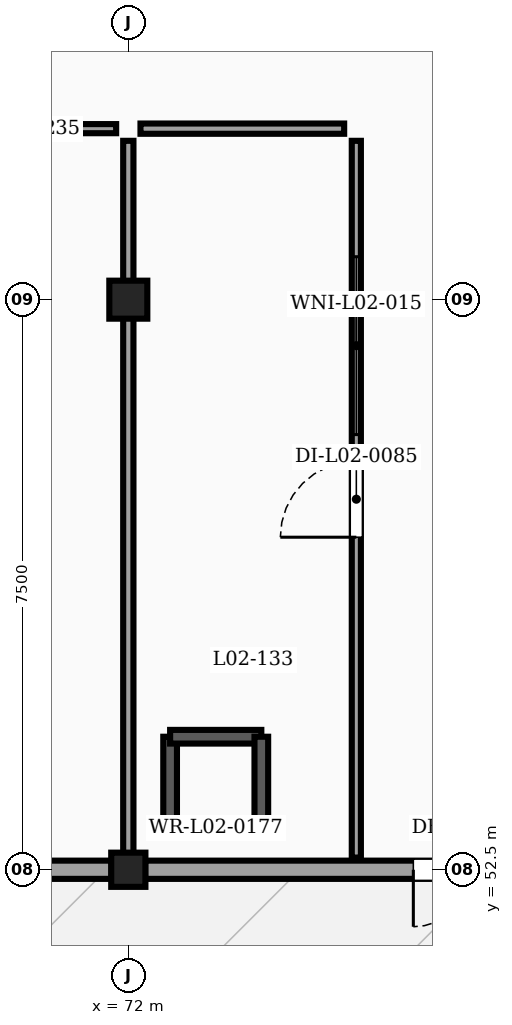
"""IFC4 building model, lengths in metres.
Left out: names, types, materials, properties, quantities, classifications, styles, units other than length and angle.
Written with IfcOpenShell. Run it as: python <this file> out.ifc"""

import sys

from ifc_helpers import new_model, si_unit, direction, frame, frame_2d, origin, origin_2d, place, context, subcontext, project, spatial, rectangle, extrude, element, fill, save


model = new_model("IFC4")
c1 = context("Model", 3, precision=1e-05, world=origin(), true_north=direction((0.0, 1.0)))
c2 = subcontext(c1, "Body", "Model", "MODEL_VIEW")
j1 = project(units=[si_unit("LENGTHUNIT", "METRE"), si_unit("PLANEANGLEUNIT", "RADIAN")], contexts=[c1])
p1 = place(None, origin())
s1 = spatial("IfcSite", under=j1, at=p1, CompositionType="ELEMENT")
p2 = place(p1, origin())
s2 = spatial("IfcBuilding", under=s1, at=p2, CompositionType="ELEMENT")
p3 = place(p2, frame((0.0, 0.0, 8.5)))
s3 = spatial("IfcBuildingStorey", under=s2, at=p3, CompositionType="ELEMENT", Elevation=8.5)
p4 = place(p3, frame((72.0, 52.5, 0.0), z_axis=(0.0, 0.0, 1.0), x_axis=(1.0, 0.0, 0.0)))
e1 = element("IfcColumn", 1, at=p4, inside=s3, PredefinedType="COLUMN", context=c2, shape_type="SweptSolid", body=[
    extrude(rectangle(XDim=0.45, YDim=0.45, at=origin_2d()), origin(), (0.0, 0.0, 1.0), 3.8),
])
p5 = place(p3, frame((72.0, 60.0, 0.0), z_axis=(0.0, 0.0, 1.0), x_axis=(1.0, 0.0, 0.0)))
e2 = element("IfcColumn", 2, at=p5, inside=s3, PredefinedType="COLUMN", context=c2, shape_type="SweptSolid", body=[
    extrude(rectangle(XDim=0.5, YDim=0.5, at=origin_2d()), origin(), (0.0, 0.0, 1.0), 3.8),
])
p6 = place(p3, frame((80.779, 52.5, 0.0), z_axis=(0.0, 0.0, 1.0), x_axis=(-1.0, 0.0, 0.0)))
e3 = element("IfcWall", 3, at=p6, inside=s3, PredefinedType="SOLIDWALL", context=c2, shape_type="SweptSolid", body=[
    extrude(rectangle(XDim=8.558, YDim=0.24, at=frame_2d((4.279, 0.0))), origin(), (0.0, 0.0, 1.0), 2.772),
])
p7 = place(p6, frame((3.529, 0.0, 0.0)))
e4 = element("IfcOpeningElement", 4, at=p7, cuts=e3, PredefinedType="OPENING", context=c2, shape_type="SweptSolid", body=[
    extrude(rectangle(XDim=1.5, YDim=2.15, at=frame_2d((0.75, 1.075))), frame((0.0, 0.13, 0.0), z_axis=(0.0, -1.0, 0.0), x_axis=(1.0, 0.0, 0.0)), (0.0, 0.0, 1.0), 0.26),
])
p8 = place(p3, frame((71.779, 52.5, 0.0), z_axis=(0.0, 0.0, 1.0), x_axis=(-1.0, 0.0, 0.0)))
e5 = element("IfcWall", 5, at=p8, inside=s3, PredefinedType="SOLIDWALL", context=c2, shape_type="SweptSolid", body=[
    extrude(rectangle(XDim=8.558, YDim=0.24, at=frame_2d((4.279, 0.0))), origin(), (0.0, 0.0, 1.0), 2.772),
])
for number, where, z_axis, x_axis in (
    (6, (73.75, 53.05, 0.0), (0.0, 0.0, 1.0), (-1.0, 0.0, 0.0)),
    (7, (72.55, 53.05, 0.0), (0.0, 0.0, 1.0), (0.0, 1.0, 0.0)),
    (8, (72.55, 54.25, 0.0), (0.0, 0.0, 1.0), (1.0, 0.0, 0.0)),
    (9, (73.75, 54.25, 0.0), (0.0, 0.0, 1.0), (0.0, -1.0, 0.0)),
):
    element("IfcWall", number, at=place(p3, frame(where, z_axis=z_axis, x_axis=x_axis)), inside=s3, PredefinedType="SHEAR", context=c2, shape_type="SweptSolid", body=[
        extrude(rectangle(XDim=1.2, YDim=0.18, at=frame_2d((0.6, 0.0))), origin(), (0.0, 0.0, 1.0), 3.57),
    ])
p9 = place(p3, frame((71.84, 62.25, 0.0), z_axis=(0.0, 0.0, 1.0), x_axis=(-1.0, 0.0, 0.0)))
e10 = element("IfcWall", 10, at=p9, inside=s3, PredefinedType="PARTITIONING", context=c2, shape_type="SweptSolid", body=[
    extrude(rectangle(XDim=2.68, YDim=0.12, at=frame_2d((1.34, 0.0))), origin(), (0.0, 0.0, 1.0), 3.57),
])
p10 = place(p3, frame((75.0, 52.66, 0.0), z_axis=(0.0, 0.0, 1.0), x_axis=(0.0, 1.0, 0.0)))
e11 = element("IfcWall", 11, at=p10, inside=s3, PredefinedType="PARTITIONING", context=c2, shape_type="SweptSolid", body=[
    extrude(rectangle(XDim=9.43, YDim=0.12, at=frame_2d((4.715, 0.0))), origin(), (0.0, 0.0, 1.0), 3.162),
])
p11 = place(p10, frame((4.215, 0.0, 0.0)))
e12 = element("IfcOpeningElement", 12, at=p11, cuts=e11, PredefinedType="OPENING", context=c2, shape_type="SweptSolid", body=[
    extrude(rectangle(XDim=1.0, YDim=2.15, at=frame_2d((0.5, 1.075))), frame((0.0, 0.07, 0.0), z_axis=(0.0, -1.0, 0.0), x_axis=(1.0, 0.0, 0.0)), (0.0, 0.0, 1.0), 0.14),
])
p12 = place(p10, frame((5.565, 0.0, 1.02)))
e13 = element("IfcOpeningElement", 13, at=p12, cuts=e11, PredefinedType="OPENING", context=c2, shape_type="SweptSolid", body=[
    extrude(rectangle(XDim=2.34, YDim=1.18, at=frame_2d((1.17, 0.59))), frame((0.0, 0.07, 0.0), z_axis=(0.0, -1.0, 0.0), x_axis=(1.0, 0.0, 0.0)), (0.0, 0.0, 1.0), 0.14),
])
p13 = place(p3, frame((74.84, 62.25, 0.0), z_axis=(0.0, 0.0, 1.0), x_axis=(-1.0, 0.0, 0.0)))
e14 = element("IfcWall", 14, at=p13, inside=s3, PredefinedType="PARTITIONING", context=c2, shape_type="SweptSolid", body=[
    extrude(rectangle(XDim=2.68, YDim=0.135, at=frame_2d((1.34, 0.0))), origin(), (0.0, 0.0, 1.0), 3.57),
])
p14 = place(p3, frame((72.0, 52.66, 0.0), z_axis=(0.0, 0.0, 1.0), x_axis=(0.0, 1.0, 0.0)))
e15 = element("IfcWall", 15, at=p14, inside=s3, PredefinedType="PARTITIONING", context=c2, shape_type="SweptSolid", body=[
    extrude(rectangle(XDim=9.43, YDim=0.135, at=frame_2d((4.715, 0.0))), origin(), (0.0, 0.0, 1.0), 2.772),
])
p15 = place(p7, origin())
e16 = element("IfcDoor", 16, at=p15, inside=s3, OperationType="DOUBLE_DOOR_SINGLE_SWING", PredefinedType="DOOR", context=c2, shape_type="SweptSolid", body=[
    extrude(rectangle(XDim=1.5, YDim=2.15, at=frame_2d((0.75, 1.075))), frame((0.0, 0.025, 0.0), z_axis=(0.0, -1.0, 0.0), x_axis=(1.0, 0.0, 0.0)), (0.0, 0.0, 1.0), 0.05),
])
fill(e4, e16)
p16 = place(p11, origin())
e17 = element("IfcDoor", 17, at=p16, inside=s3, OperationType="SINGLE_SWING_LEFT", PredefinedType="DOOR", context=c2, shape_type="SweptSolid", body=[
    extrude(rectangle(XDim=1.0, YDim=2.15, at=frame_2d((0.5, 1.075))), frame((0.0, 0.025, 0.0), z_axis=(0.0, -1.0, 0.0), x_axis=(1.0, 0.0, 0.0)), (0.0, 0.0, 1.0), 0.05),
])
fill(e12, e17)
p17 = place(p12, origin())
e18 = element("IfcWindow", 18, at=p17, inside=s3, PartitioningType="DOUBLE_PANEL_VERTICAL", PredefinedType="WINDOW", context=c2, shape_type="SweptSolid", body=[
    extrude(rectangle(XDim=2.34, YDim=1.18, at=frame_2d((1.17, 0.59))), frame((0.0, 0.03, 0.0), z_axis=(0.0, -1.0, 0.0), x_axis=(1.0, 0.0, 0.0)), (0.0, 0.0, 1.0), 0.06),
])
fill(e13, e18)
save(model, sys.argv[1])
